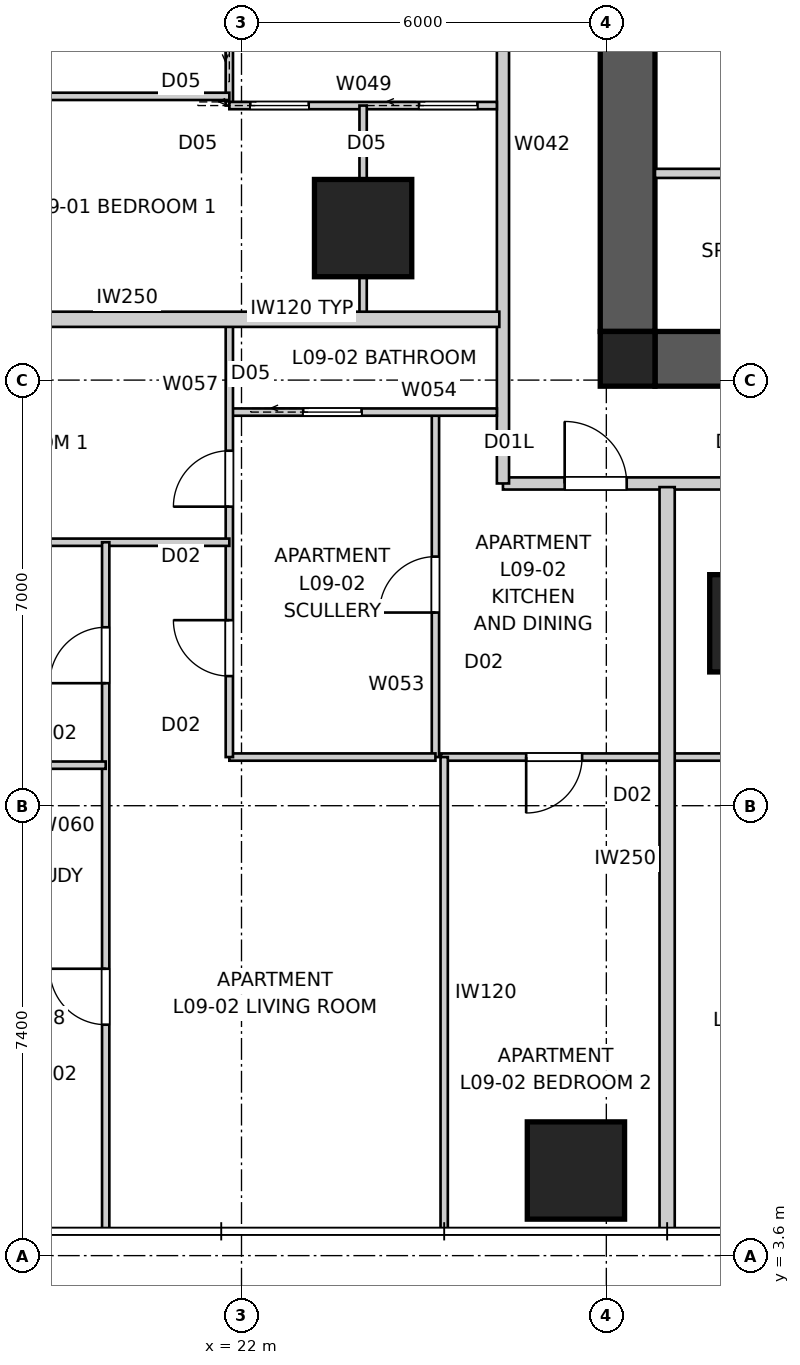
"""IFC4 building model, lengths in metres.
Left out: names, types, materials, properties, quantities, classifications, styles, units other than length and angle.
Written with IfcOpenShell. Run it as: python <this file> out.ifc"""

import sys

from ifc_helpers import new_model, si_unit, direction, frame, frame_2d, origin, origin_2d, place, context, subcontext, project, spatial, polyline, rectangle, outline, extrude, element, fill, save


model = new_model("IFC4")
c1 = context("Model", 3, precision=1e-05, world=origin(), true_north=direction((0.0, 1.0)))
c2 = subcontext(c1, "Body", "Model", "MODEL_VIEW")
j1 = project(units=[si_unit("LENGTHUNIT", "METRE"), si_unit("PLANEANGLEUNIT", "RADIAN")], contexts=[c1])
p1 = place(None, origin())
s1 = spatial("IfcSite", under=j1, at=p1, CompositionType="ELEMENT")
p2 = place(p1, origin())
s2 = spatial("IfcBuilding", under=s1, at=p2, CompositionType="ELEMENT")
p3 = place(p2, frame((0.0, 0.0, 35.4)))
s3 = spatial("IfcBuildingStorey", under=s2, at=p3, CompositionType="ELEMENT", Elevation=35.4)
p4 = place(p3, frame((51.2, 18.35, 0.0), z_axis=(0.0, 0.0, 1.0), x_axis=(-1.0, 0.0, 0.0)))
e1 = element("IfcWall", 1, at=p4, inside=s3, PredefinedType="SHEAR", context=c2, shape_type="SweptSolid", body=[
    extrude(outline(polyline([(0.0, -0.45), (22.4, -0.45), (22.4, -0.025), (22.85, -0.025), (22.85, 0.025), (22.4, 0.025), (22.4, 0.45), (0.0, 0.45), (0.0, 0.025), (-0.45, 0.025), (-0.45, -0.025), (0.0, -0.025), (0.0, -0.45)])), origin(), (0.0, 0.0, 1.0), 3.4),
])
p5 = place(p3, frame((28.35, 41.2, 0.0), z_axis=(0.0, 0.0, 1.0), x_axis=(0.0, -1.0, 0.0)))
e2 = element("IfcWall", 2, at=p5, inside=s3, PredefinedType="SHEAR", context=c2, shape_type="SweptSolid", body=[
    extrude(outline(polyline([(0.0, -0.45), (22.4, -0.45), (22.4, -0.025), (22.85, -0.025), (22.85, 0.025), (22.4, 0.025), (22.4, 0.45), (0.0, 0.45), (0.0, 0.025), (-0.45, 0.025), (-0.45, -0.025), (0.0, -0.025), (0.0, -0.45)])), origin(), (0.0, 0.0, 1.0), 3.4),
])
p6 = place(p5, frame((11.14, 0.0, 0.0)))
e3 = element("IfcOpeningElement", 3, at=p6, cuts=e2, PredefinedType="OPENING", context=c2, shape_type="SweptSolid", body=[
    extrude(rectangle(XDim=1.02, YDim=2.4, at=frame_2d((0.51, 1.2))), frame((0.0, 0.46, 0.0), z_axis=(0.0, -1.0, 0.0), x_axis=(1.0, 0.0, 0.0)), (0.0, 0.0, 1.0), 0.92),
])
p7 = place(p3, frame((28.35, 18.35, 0.0), z_axis=(0.0, 0.0, 1.0), x_axis=(1.0, 0.0, 0.0)))
e4 = element("IfcColumn", 4, at=p7, inside=s3, PredefinedType="COLUMN", context=c2, shape_type="SweptSolid", body=[
    extrude(rectangle(XDim=0.9, YDim=0.9, at=origin_2d()), origin(), (0.0, 0.0, 1.0), 3.4),
])
for number, where, z_axis, x_axis in (
    (5, (27.5, 5.0, 0.0), (0.0, 0.0, 1.0), (1.0, 0.0, 0.0)),
    (6, (24.0, 20.5, 0.0), (0.0, 0.0, 1.0), (1.0, 0.0, 0.0)),
    (7, (30.5, 14.0, 0.0), (0.0, 0.0, 1.0), (1.0, 0.0, 0.0)),
):
    element("IfcColumn", number, at=place(p3, frame(where, z_axis=z_axis, x_axis=x_axis)), inside=s3, PredefinedType="COLUMN", context=c2, shape_type="SweptSolid", body=[
        extrude(rectangle(XDim=1.6, YDim=1.6, at=origin_2d()), origin(), (0.0, 0.0, 1.0), 3.4),
    ])
p8 = place(p3, frame((26.3, 16.3, 0.0), z_axis=(0.0, 0.0, 1.0), x_axis=(1.0, 0.0, 0.0)))
e8 = element("IfcWall", 8, at=p8, inside=s3, PredefinedType="PARTITIONING", context=c2, shape_type="SweptSolid", body=[
    extrude(rectangle(XDim=28.2, YDim=0.2, at=frame_2d((14.1, 0.0))), origin(), (0.0, 0.0, 1.0), 3.25),
])
p9 = place(p8, frame((4.738, 0.0, 0.0)))
e9 = element("IfcOpeningElement", 9, at=p9, cuts=e8, PredefinedType="OPENING", context=c2, shape_type="SweptSolid", body=[
    extrude(rectangle(XDim=1.02, YDim=2.34, at=frame_2d((0.51, 1.17))), frame((0.0, 0.11, 0.0), z_axis=(0.0, -1.0, 0.0), x_axis=(1.0, 0.0, 0.0)), (0.0, 0.0, 1.0), 0.22),
])
p10 = place(p8, frame((14.525, 0.0, 0.0)))
e10 = element("IfcOpeningElement", 10, at=p10, cuts=e8, PredefinedType="OPENING", context=c2, shape_type="SweptSolid", body=[
    extrude(rectangle(XDim=1.02, YDim=2.34, at=frame_2d((0.51, 1.17))), frame((0.0, 0.11, 0.0), z_axis=(0.0, -1.0, 0.0), x_axis=(1.0, 0.0, 0.0)), (0.0, 0.0, 1.0), 0.22),
])
p11 = place(p8, frame((22.333, 0.0, 0.0)))
e11 = element("IfcOpeningElement", 11, at=p11, cuts=e8, PredefinedType="OPENING", context=c2, shape_type="SweptSolid", body=[
    extrude(rectangle(XDim=1.02, YDim=2.34, at=frame_2d((0.51, 1.17))), frame((0.0, 0.11, 0.0), z_axis=(0.0, -1.0, 0.0), x_axis=(1.0, 0.0, 0.0)), (0.0, 0.0, 1.0), 0.22),
])
p12 = place(p8, frame((25.765, 0.0, 0.0)))
e12 = element("IfcOpeningElement", 12, at=p12, cuts=e8, PredefinedType="OPENING", context=c2, shape_type="SweptSolid", body=[
    extrude(rectangle(XDim=1.02, YDim=2.1, at=frame_2d((0.51, 1.05))), frame((0.0, 0.11, 0.0), z_axis=(0.0, -1.0, 0.0), x_axis=(1.0, 0.0, 0.0)), (0.0, 0.0, 1.0), 0.22),
])
p13 = place(p8, frame((1.015, 0.0, 0.0)))
e13 = element("IfcOpeningElement", 13, at=p13, cuts=e8, PredefinedType="OPENING", context=c2, shape_type="SweptSolid", body=[
    extrude(rectangle(XDim=1.02, YDim=2.1, at=frame_2d((0.51, 1.05))), frame((0.0, 0.11, 0.0), z_axis=(0.0, -1.0, 0.0), x_axis=(1.0, 0.0, 0.0)), (0.0, 0.0, 1.0), 0.22),
])
p14 = place(p3, frame((26.3, 44.5, 0.0), z_axis=(0.0, 0.0, 1.0), x_axis=(0.0, -1.0, 0.0)))
e14 = element("IfcWall", 14, at=p14, inside=s3, PredefinedType="PARTITIONING", context=c2, shape_type="SweptSolid", body=[
    extrude(rectangle(XDim=28.2, YDim=0.2, at=frame_2d((14.1, 0.0))), origin(), (0.0, 0.0, 1.0), 3.25),
])
p15 = place(p14, frame((11.826, 0.0, 0.0)))
e15 = element("IfcOpeningElement", 15, at=p15, cuts=e14, PredefinedType="OPENING", context=c2, shape_type="SweptSolid", body=[
    extrude(rectangle(XDim=1.02, YDim=2.34, at=frame_2d((0.51, 1.17))), frame((0.0, 0.11, 0.0), z_axis=(0.0, -1.0, 0.0), x_axis=(1.0, 0.0, 0.0)), (0.0, 0.0, 1.0), 0.22),
])
p16 = place(p14, frame((16.048, 0.0, 0.0)))
e16 = element("IfcOpeningElement", 16, at=p16, cuts=e14, PredefinedType="OPENING", context=c2, shape_type="SweptSolid", body=[
    extrude(rectangle(XDim=1.02, YDim=2.34, at=frame_2d((0.51, 1.17))), frame((0.0, 0.11, 0.0), z_axis=(0.0, -1.0, 0.0), x_axis=(1.0, 0.0, 0.0)), (0.0, 0.0, 1.0), 0.22),
])
p17 = place(p14, frame((1.415, 0.0, 0.0)))
e17 = element("IfcOpeningElement", 17, at=p17, cuts=e14, PredefinedType="OPENING", context=c2, shape_type="SweptSolid", body=[
    extrude(rectangle(XDim=1.02, YDim=2.1, at=frame_2d((0.51, 1.05))), frame((0.0, 0.11, 0.0), z_axis=(0.0, -1.0, 0.0), x_axis=(1.0, 0.0, 0.0)), (0.0, 0.0, 1.0), 0.22),
])
for number, where, z_axis, x_axis in (
    (18, (29.0, 4.0, 0.0), (0.0, 0.0, 1.0), (0.0, 1.0, 0.0)),
    (19, (14.0, 19.0, 0.0), (0.0, 0.0, 1.0), (1.0, 0.0, 0.0)),
):
    element("IfcWall", number, at=place(p3, frame(where, z_axis=z_axis, x_axis=x_axis)), inside=s3, PredefinedType="PARTITIONING", context=c2, shape_type="SweptSolid", body=[
        extrude(rectangle(XDim=12.24, YDim=0.25, at=frame_2d((6.12, 0.0))), origin(), (0.0, 0.0, 1.0), 3.25),
    ])
p18 = place(p3, frame((34.25, 21.4, 0.0), z_axis=(0.0, 0.0, 1.0), x_axis=(-1.0, 0.0, 0.0)))
e20 = element("IfcWall", 20, at=p18, inside=s3, PredefinedType="SOLIDWALL", context=c2, shape_type="SweptSolid", body=[
    extrude(rectangle(XDim=5.45, YDim=0.15, at=frame_2d((2.725, 0.0))), origin(), (0.0, 0.0, 1.0), 3.25),
])
p19 = place(p18, frame((2.265, 0.0, 0.0)))
e21 = element("IfcOpeningElement", 21, at=p19, cuts=e20, PredefinedType="OPENING", context=c2, shape_type="SweptSolid", body=[
    extrude(rectangle(XDim=0.92, YDim=2.1, at=frame_2d((0.46, 1.05))), frame((0.0, 0.085, 0.0), z_axis=(0.0, -1.0, 0.0), x_axis=(1.0, 0.0, 0.0)), (0.0, 0.0, 1.0), 0.17),
])
p20 = place(p3, frame((21.8, 22.515, 0.0), z_axis=(0.0, 0.0, 1.0), x_axis=(0.0, 1.0, 0.0)))
e22 = element("IfcWall", 22, at=p20, inside=s3, PredefinedType="PARTITIONING", context=c2, shape_type="SweptSolid", body=[
    extrude(rectangle(XDim=15.207, YDim=0.12, at=frame_2d((7.603, 0.0))), origin(), (0.0, 0.0, 1.0), 3.25),
])
p21 = place(p20, frame((8.883, 0.0, 0.0)))
e23 = element("IfcOpeningElement", 23, at=p21, cuts=e22, PredefinedType="OPENING", context=c2, shape_type="SweptSolid", body=[
    extrude(rectangle(XDim=0.92, YDim=2.34, at=frame_2d((0.46, 1.17))), frame((0.0, 0.07, 0.0), z_axis=(0.0, -1.0, 0.0), x_axis=(1.0, 0.0, 0.0)), (0.0, 0.0, 1.0), 0.14),
])
p22 = place(p20, frame((5.166, 0.0, 0.0)))
e24 = element("IfcOpeningElement", 24, at=p22, cuts=e22, PredefinedType="OPENING", context=c2, shape_type="SweptSolid", body=[
    extrude(rectangle(XDim=0.92, YDim=2.34, at=frame_2d((0.46, 1.17))), frame((0.0, 0.07, 0.0), z_axis=(0.0, -1.0, 0.0), x_axis=(1.0, 0.0, 0.0)), (0.0, 0.0, 1.0), 0.14),
])
p23 = place(p20, frame((12.86, 0.0, 0.0)))
e25 = element("IfcOpeningElement", 25, at=p23, cuts=e22, PredefinedType="OPENING", context=c2, shape_type="SweptSolid", body=[
    extrude(rectangle(XDim=0.96, YDim=2.1, at=frame_2d((0.48, 1.05))), frame((0.0, 0.07, 0.0), z_axis=(0.0, -1.0, 0.0), x_axis=(1.0, 0.0, 0.0)), (0.0, 0.0, 1.0), 0.14),
])
p24 = place(p20, frame((1.255, 0.0, 0.0)))
e26 = element("IfcOpeningElement", 26, at=p24, cuts=e22, PredefinedType="OPENING", context=c2, shape_type="SweptSolid", body=[
    extrude(rectangle(XDim=0.96, YDim=2.1, at=frame_2d((0.48, 1.05))), frame((0.0, 0.07, 0.0), z_axis=(0.0, -1.0, 0.0), x_axis=(1.0, 0.0, 0.0)), (0.0, 0.0, 1.0), 0.14),
])
p25 = place(p3, frame((21.8, 22.515, 0.0), z_axis=(0.0, 0.0, 1.0), x_axis=(1.0, 0.0, 0.0)))
e27 = element("IfcWall", 27, at=p25, inside=s3, PredefinedType="PARTITIONING", context=c2, shape_type="SweptSolid", body=[
    extrude(rectangle(XDim=4.4, YDim=0.12, at=frame_2d((2.2, 0.0))), origin(), (0.0, 0.0, 1.0), 3.25),
])
p26 = place(p25, frame((0.345, 0.0, 0.0)))
e28 = element("IfcOpeningElement", 28, at=p26, cuts=e27, PredefinedType="OPENING", context=c2, shape_type="SweptSolid", body=[
    extrude(rectangle(XDim=0.96, YDim=2.1, at=frame_2d((0.48, 1.05))), frame((0.0, 0.07, 0.0), z_axis=(0.0, -1.0, 0.0), x_axis=(1.0, 0.0, 0.0)), (0.0, 0.0, 1.0), 0.14),
])
p27 = place(p25, frame((3.12, 0.0, 0.0)))
e29 = element("IfcOpeningElement", 29, at=p27, cuts=e27, PredefinedType="OPENING", context=c2, shape_type="SweptSolid", body=[
    extrude(rectangle(XDim=0.96, YDim=2.1, at=frame_2d((0.48, 1.05))), frame((0.0, 0.07, 0.0), z_axis=(0.0, -1.0, 0.0), x_axis=(1.0, 0.0, 0.0)), (0.0, 0.0, 1.0), 0.14),
])
p28 = place(p3, frame((24.0, 19.0, 0.0), z_axis=(0.0, 0.0, 1.0), x_axis=(0.0, 1.0, 0.0)))
e30 = element("IfcWall", 30, at=p28, inside=s3, PredefinedType="PARTITIONING", context=c2, shape_type="SweptSolid", body=[
    extrude(rectangle(XDim=3.515, YDim=0.12, at=frame_2d((1.758, 0.0))), origin(), (0.0, 0.0, 1.0), 2.549),
])
p29 = place(p3, frame((14.04, 22.667, 0.0), z_axis=(0.0, 0.0, 1.0), x_axis=(1.0, 0.0, 0.0)))
e31 = element("IfcWall", 31, at=p29, inside=s3, PredefinedType="PARTITIONING", context=c2, shape_type="SweptSolid", body=[
    extrude(rectangle(XDim=7.76, YDim=0.12, at=frame_2d((3.88, 0.0))), origin(), (0.0, 0.0, 1.0), 3.25),
])
p30 = place(p3, frame((25.189, 11.8, 0.0), z_axis=(0.0, 0.0, 1.0), x_axis=(0.0, 1.0, 0.0)))
e32 = element("IfcWall", 32, at=p30, inside=s3, PredefinedType="PARTITIONING", context=c2, shape_type="SweptSolid", body=[
    extrude(rectangle(XDim=5.674, YDim=0.12, at=frame_2d((2.837, 0.0))), origin(), (0.0, 0.0, 1.0), 3.25),
])
p31 = place(p30, frame((2.377, 0.0, 0.0)))
e33 = element("IfcOpeningElement", 33, at=p31, cuts=e32, PredefinedType="OPENING", context=c2, shape_type="SweptSolid", body=[
    extrude(rectangle(XDim=0.92, YDim=2.34, at=frame_2d((0.46, 1.17))), frame((0.0, 0.07, 0.0), z_axis=(0.0, -1.0, 0.0), x_axis=(1.0, 0.0, 0.0)), (0.0, 0.0, 1.0), 0.14),
])
p32 = place(p3, frame((21.8, 17.474, 0.0), z_axis=(0.0, 0.0, 1.0), x_axis=(1.0, 0.0, 0.0)))
e34 = element("IfcWall", 34, at=p32, inside=s3, PredefinedType="PARTITIONING", context=c2, shape_type="SweptSolid", body=[
    extrude(rectangle(XDim=4.4, YDim=0.12, at=frame_2d((2.2, 0.0))), origin(), (0.0, 0.0, 1.0), 3.25),
])
p33 = place(p32, frame((1.215, 0.0, 0.0)))
e35 = element("IfcOpeningElement", 35, at=p33, cuts=e34, PredefinedType="OPENING", context=c2, shape_type="SweptSolid", body=[
    extrude(rectangle(XDim=0.96, YDim=2.1, at=frame_2d((0.48, 1.05))), frame((0.0, 0.07, 0.0), z_axis=(0.0, -1.0, 0.0), x_axis=(1.0, 0.0, 0.0)), (0.0, 0.0, 1.0), 0.14),
])
p34 = place(p3, frame((47.287, 11.8, 0.0), z_axis=(0.0, 0.0, 1.0), x_axis=(-1.0, 0.0, 0.0)))
e36 = element("IfcWall", 36, at=p34, inside=s3, PredefinedType="PARTITIONING", context=c2, shape_type="SweptSolid", body=[
    extrude(rectangle(XDim=22.003, YDim=0.12, at=frame_2d((11.002, 0.0))), origin(), (0.0, 0.0, 1.0), 3.25),
])
p35 = place(p34, frame((15.968, 0.0, 0.0)))
e37 = element("IfcOpeningElement", 37, at=p35, cuts=e36, PredefinedType="OPENING", context=c2, shape_type="SweptSolid", body=[
    extrude(rectangle(XDim=0.92, YDim=2.34, at=frame_2d((0.46, 1.17))), frame((0.0, 0.07, 0.0), z_axis=(0.0, -1.0, 0.0), x_axis=(1.0, 0.0, 0.0)), (0.0, 0.0, 1.0), 0.14),
])
p36 = place(p34, frame((13.47, 0.0, 0.0)))
e38 = element("IfcOpeningElement", 38, at=p36, cuts=e36, PredefinedType="OPENING", context=c2, shape_type="SweptSolid", body=[
    extrude(rectangle(XDim=0.92, YDim=2.34, at=frame_2d((0.46, 1.17))), frame((0.0, 0.07, 0.0), z_axis=(0.0, -1.0, 0.0), x_axis=(1.0, 0.0, 0.0)), (0.0, 0.0, 1.0), 0.14),
])
p37 = place(p34, frame((5.018, 0.0, 0.0)))
e39 = element("IfcOpeningElement", 39, at=p37, cuts=e36, PredefinedType="OPENING", context=c2, shape_type="SweptSolid", body=[
    extrude(rectangle(XDim=0.92, YDim=2.34, at=frame_2d((0.46, 1.17))), frame((0.0, 0.07, 0.0), z_axis=(0.0, -1.0, 0.0), x_axis=(1.0, 0.0, 0.0)), (0.0, 0.0, 1.0), 0.14),
])
p38 = place(p34, frame((19.685, 0.0, 0.0)))
e40 = element("IfcOpeningElement", 40, at=p38, cuts=e36, PredefinedType="OPENING", context=c2, shape_type="SweptSolid", body=[
    extrude(rectangle(XDim=0.92, YDim=2.34, at=frame_2d((0.46, 1.17))), frame((0.0, 0.07, 0.0), z_axis=(0.0, -1.0, 0.0), x_axis=(1.0, 0.0, 0.0)), (0.0, 0.0, 1.0), 0.14),
])
p39 = place(p34, frame((9.138, 0.0, 0.0)))
e41 = element("IfcOpeningElement", 41, at=p39, cuts=e36, PredefinedType="OPENING", context=c2, shape_type="SweptSolid", body=[
    extrude(rectangle(XDim=0.96, YDim=2.1, at=frame_2d((0.48, 1.05))), frame((0.0, 0.07, 0.0), z_axis=(0.0, -1.0, 0.0), x_axis=(1.0, 0.0, 0.0)), (0.0, 0.0, 1.0), 0.14),
])
p40 = place(p3, frame((25.189, 11.8, 0.0), z_axis=(0.0, 0.0, 1.0), x_axis=(-1.0, 0.0, 0.0)))
e42 = element("IfcWall", 42, at=p40, inside=s3, PredefinedType="PARTITIONING", context=c2, shape_type="SweptSolid", body=[
    extrude(rectangle(XDim=3.389, YDim=0.12, at=frame_2d((1.695, 0.0))), origin(), (0.0, 0.0, 1.0), 3.25),
])
p41 = place(p3, frame((21.8, 11.8, 0.0), z_axis=(0.0, 0.0, 1.0), x_axis=(0.0, 1.0, 0.0)))
e43 = element("IfcWall", 43, at=p41, inside=s3, PredefinedType="PARTITIONING", context=c2, shape_type="SweptSolid", body=[
    extrude(rectangle(XDim=7.2, YDim=0.12, at=frame_2d((3.6, 0.0))), origin(), (0.0, 0.0, 1.0), 3.25),
])
p42 = place(p41, frame((1.332, 0.0, 0.0)))
e44 = element("IfcOpeningElement", 44, at=p42, cuts=e43, PredefinedType="OPENING", context=c2, shape_type="SweptSolid", body=[
    extrude(rectangle(XDim=0.92, YDim=2.34, at=frame_2d((0.46, 1.17))), frame((0.0, 0.07, 0.0), z_axis=(0.0, -1.0, 0.0), x_axis=(1.0, 0.0, 0.0)), (0.0, 0.0, 1.0), 0.14),
])
p43 = place(p41, frame((4.119, 0.0, 0.0)))
e45 = element("IfcOpeningElement", 45, at=p43, cuts=e43, PredefinedType="OPENING", context=c2, shape_type="SweptSolid", body=[
    extrude(rectangle(XDim=0.92, YDim=2.34, at=frame_2d((0.46, 1.17))), frame((0.0, 0.07, 0.0), z_axis=(0.0, -1.0, 0.0), x_axis=(1.0, 0.0, 0.0)), (0.0, 0.0, 1.0), 0.14),
])
for number, where, z_axis, x_axis in (
    (46, (14.04, 15.333, 0.0), (0.0, 0.0, 1.0), (1.0, 0.0, 0.0)),
    (47, (25.333, 11.8, 0.0), (0.0, 0.0, 1.0), (0.0, -1.0, 0.0)),
):
    element("IfcWall", number, at=place(p3, frame(where, z_axis=z_axis, x_axis=x_axis)), inside=s3, PredefinedType="PARTITIONING", context=c2, shape_type="SweptSolid", body=[
        extrude(rectangle(XDim=7.76, YDim=0.12, at=frame_2d((3.88, 0.0))), origin(), (0.0, 0.0, 1.0), 2.638),
    ])
p44 = place(p3, frame((19.767, 4.04, 0.0), z_axis=(0.0, 0.0, 1.0), x_axis=(0.0, 1.0, 0.0)))
e48 = element("IfcWall", 48, at=p44, inside=s3, PredefinedType="PARTITIONING", context=c2, shape_type="SweptSolid", body=[
    extrude(rectangle(XDim=11.293, YDim=0.12, at=frame_2d((5.646, 0.0))), origin(), (0.0, 0.0, 1.0), 3.25),
])
p45 = place(p44, frame((3.358, 0.0, 0.0)))
e49 = element("IfcOpeningElement", 49, at=p45, cuts=e48, PredefinedType="OPENING", context=c2, shape_type="SweptSolid", body=[
    extrude(rectangle(XDim=0.92, YDim=2.34, at=frame_2d((0.46, 1.17))), frame((0.0, 0.07, 0.0), z_axis=(0.0, -1.0, 0.0), x_axis=(1.0, 0.0, 0.0)), (0.0, 0.0, 1.0), 0.14),
])
p46 = place(p44, frame((8.975, 0.0, 0.0)))
e50 = element("IfcOpeningElement", 50, at=p46, cuts=e48, PredefinedType="OPENING", context=c2, shape_type="SweptSolid", body=[
    extrude(rectangle(XDim=0.92, YDim=2.34, at=frame_2d((0.46, 1.17))), frame((0.0, 0.07, 0.0), z_axis=(0.0, -1.0, 0.0), x_axis=(1.0, 0.0, 0.0)), (0.0, 0.0, 1.0), 0.14),
])
p47 = place(p3, frame((14.04, 11.667, 0.0), z_axis=(0.0, 0.0, 1.0), x_axis=(1.0, 0.0, 0.0)))
e51 = element("IfcWall", 51, at=p47, inside=s3, PredefinedType="PARTITIONING", context=c2, shape_type="SweptSolid", body=[
    extrude(rectangle(XDim=5.727, YDim=0.12, at=frame_2d((2.863, 0.0))), origin(), (0.0, 0.0, 1.0), 3.25),
])
p48 = place(p13, origin())
e52 = element("IfcDoor", 52, at=p48, inside=s3, OperationType="SINGLE_SWING_LEFT", PredefinedType="DOOR", context=c2, shape_type="SweptSolid", body=[
    extrude(rectangle(XDim=1.02, YDim=2.1, at=frame_2d((0.51, 1.05))), frame((0.0, 0.025, 0.0), z_axis=(0.0, -1.0, 0.0), x_axis=(1.0, 0.0, 0.0)), (0.0, 0.0, 1.0), 0.05),
])
fill(e13, e52)
p49 = place(p31, origin())
e53 = element("IfcDoor", 53, at=p49, inside=s3, OperationType="SINGLE_SWING_LEFT", PredefinedType="DOOR", context=c2, shape_type="SweptSolid", body=[
    extrude(rectangle(XDim=0.92, YDim=2.34, at=frame_2d((0.46, 1.17))), frame((0.0, 0.025, 0.0), z_axis=(0.0, -1.0, 0.0), x_axis=(1.0, 0.0, 0.0)), (0.0, 0.0, 1.0), 0.05),
])
fill(e33, e53)
p50 = place(p38, origin())
e54 = element("IfcDoor", 54, at=p50, inside=s3, OperationType="SINGLE_SWING_RIGHT", PredefinedType="DOOR", context=c2, shape_type="SweptSolid", body=[
    extrude(rectangle(XDim=0.92, YDim=2.34, at=frame_2d((0.46, 1.17))), frame((0.0, 0.025, 0.0), z_axis=(0.0, -1.0, 0.0), x_axis=(1.0, 0.0, 0.0)), (0.0, 0.0, 1.0), 0.05),
])
fill(e40, e54)
p51 = place(p26, origin())
e55 = element("IfcDoor", 55, at=p51, inside=s3, OperationType="SLIDING_TO_LEFT", PredefinedType="DOOR", context=c2, shape_type="SweptSolid", body=[
    extrude(rectangle(XDim=0.96, YDim=2.1, at=frame_2d((0.48, 1.05))), frame((0.0, 0.025, 0.0), z_axis=(0.0, -1.0, 0.0), x_axis=(1.0, 0.0, 0.0)), (0.0, 0.0, 1.0), 0.05),
])
fill(e28, e55)
p52 = place(p27, origin())
e56 = element("IfcDoor", 56, at=p52, inside=s3, OperationType="SLIDING_TO_LEFT", PredefinedType="DOOR", context=c2, shape_type="SweptSolid", body=[
    extrude(rectangle(XDim=0.96, YDim=2.1, at=frame_2d((0.48, 1.05))), frame((0.0, 0.025, 0.0), z_axis=(0.0, -1.0, 0.0), x_axis=(1.0, 0.0, 0.0)), (0.0, 0.0, 1.0), 0.05),
])
fill(e29, e56)
p53 = place(p42, origin())
e57 = element("IfcDoor", 57, at=p53, inside=s3, OperationType="SINGLE_SWING_RIGHT", PredefinedType="DOOR", context=c2, shape_type="SweptSolid", body=[
    extrude(rectangle(XDim=0.92, YDim=2.34, at=frame_2d((0.46, 1.17))), frame((0.0, 0.025, 0.0), z_axis=(0.0, -1.0, 0.0), x_axis=(1.0, 0.0, 0.0)), (0.0, 0.0, 1.0), 0.05),
])
fill(e44, e57)
p54 = place(p33, origin())
e58 = element("IfcDoor", 58, at=p54, inside=s3, OperationType="SLIDING_TO_LEFT", PredefinedType="DOOR", context=c2, shape_type="SweptSolid", body=[
    extrude(rectangle(XDim=0.96, YDim=2.1, at=frame_2d((0.48, 1.05))), frame((0.0, 0.025, 0.0), z_axis=(0.0, -1.0, 0.0), x_axis=(1.0, 0.0, 0.0)), (0.0, 0.0, 1.0), 0.05),
])
fill(e35, e58)
p55 = place(p43, origin())
e59 = element("IfcDoor", 59, at=p55, inside=s3, OperationType="SINGLE_SWING_LEFT", PredefinedType="DOOR", context=c2, shape_type="SweptSolid", body=[
    extrude(rectangle(XDim=0.92, YDim=2.34, at=frame_2d((0.46, 1.17))), frame((0.0, 0.025, 0.0), z_axis=(0.0, -1.0, 0.0), x_axis=(1.0, 0.0, 0.0)), (0.0, 0.0, 1.0), 0.05),
])
fill(e45, e59)
p56 = place(p45, origin())
e60 = element("IfcDoor", 60, at=p56, inside=s3, OperationType="SINGLE_SWING_RIGHT", PredefinedType="DOOR", context=c2, shape_type="SweptSolid", body=[
    extrude(rectangle(XDim=0.92, YDim=2.34, at=frame_2d((0.46, 1.17))), frame((0.0, 0.025, 0.0), z_axis=(0.0, -1.0, 0.0), x_axis=(1.0, 0.0, 0.0)), (0.0, 0.0, 1.0), 0.05),
])
fill(e49, e60)
p57 = place(p46, origin())
e61 = element("IfcDoor", 61, at=p57, inside=s3, OperationType="SINGLE_SWING_LEFT", PredefinedType="DOOR", context=c2, shape_type="SweptSolid", body=[
    extrude(rectangle(XDim=0.92, YDim=2.34, at=frame_2d((0.46, 1.17))), frame((0.0, 0.025, 0.0), z_axis=(0.0, -1.0, 0.0), x_axis=(1.0, 0.0, 0.0)), (0.0, 0.0, 1.0), 0.05),
])
fill(e50, e61)
save(model, sys.argv[1])
